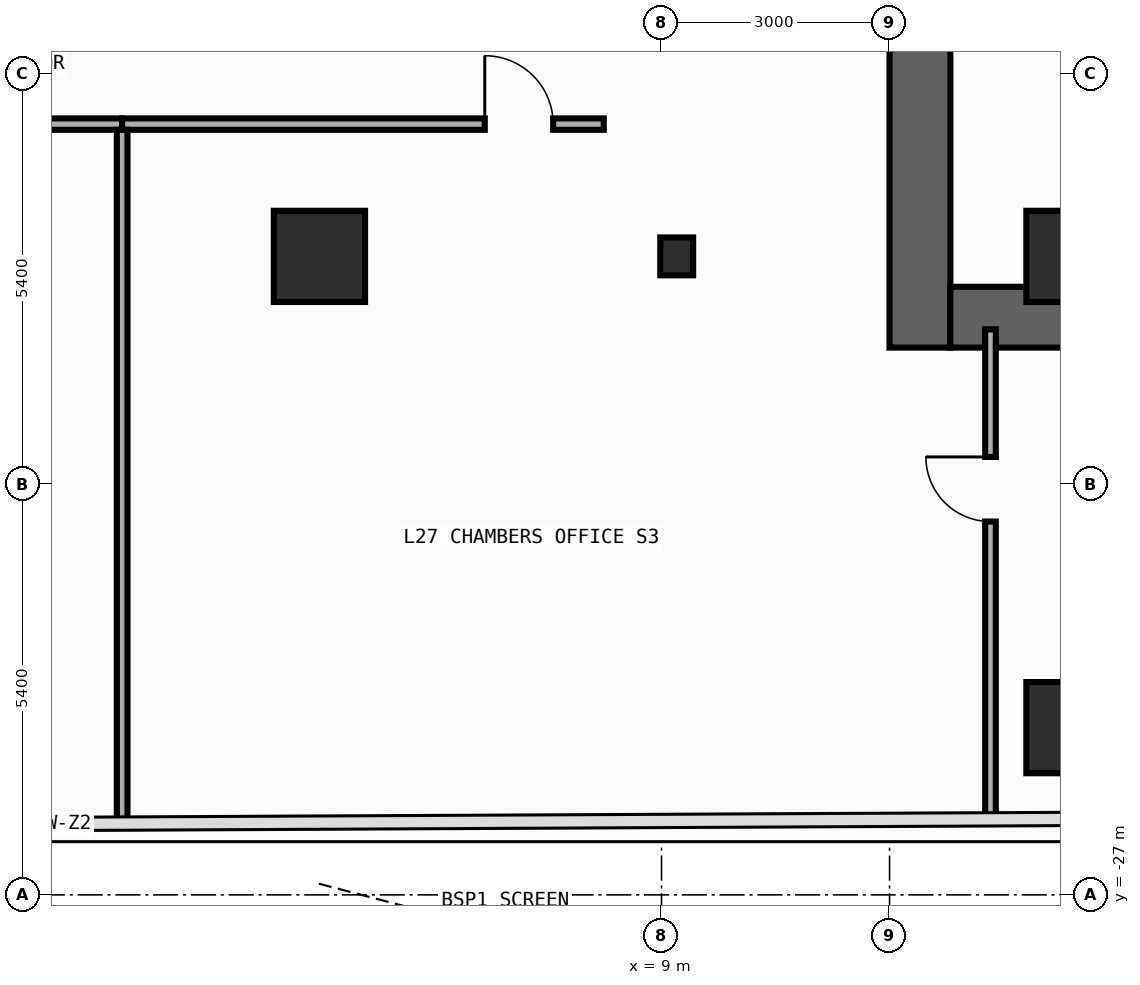
"""IFC4 building model, lengths in metres.
Left out: names, types, materials, properties, quantities, classifications, styles, units other than length and angle.
Written with IfcOpenShell. Run it as: python <this file> out.ifc"""

import sys

from ifc_helpers import new_model, si_unit, direction, frame, frame_2d, origin, origin_2d, place, context, subcontext, project, spatial, rectangle, i_section, extrude, element, fill, save


model = new_model("IFC4")
c1 = context("Model", 3, precision=1e-05, world=origin(), true_north=direction((0.0, 1.0)))
c2 = subcontext(c1, "Body", "Model", "MODEL_VIEW")
j1 = project(units=[si_unit("LENGTHUNIT", "METRE"), si_unit("PLANEANGLEUNIT", "RADIAN")], contexts=[c1])
p1 = place(None, origin())
s1 = spatial("IfcSite", under=j1, at=p1, CompositionType="ELEMENT")
p2 = place(p1, origin())
s2 = spatial("IfcBuilding", under=s1, at=p2, CompositionType="ELEMENT")
p3 = place(p2, frame((0.0, 0.0, 118.4)))
s3 = spatial("IfcBuildingStorey", under=s2, at=p3, CompositionType="ELEMENT", Elevation=118.4)
p4 = place(p3, frame((12.4, -19.8, 0.0), z_axis=(0.0, 0.0, 1.0), x_axis=(0.0, 1.0, 0.0)))
e1 = element("IfcWall", 1, at=p4, inside=s3, PredefinedType="SHEAR", context=c2, shape_type="SweptSolid", body=[
    extrude(rectangle(XDim=27.0, YDim=0.8, at=frame_2d((13.5, 0.0))), origin(), (0.0, 0.0, 1.0), 3.94),
])
p5 = place(p4, frame((23.05, 0.0, 0.0)))
e2 = element("IfcOpeningElement", 2, at=p5, cuts=e1, PredefinedType="OPENING", context=c2, shape_type="SweptSolid", body=[
    extrude(rectangle(XDim=1.1, YDim=2.2, at=frame_2d((0.55, 1.1))), frame((0.0, 0.41, 0.0), z_axis=(0.0, -1.0, 0.0), x_axis=(1.0, 0.0, 0.0)), (0.0, 0.0, 1.0), 0.82),
])
p6 = place(p4, frame((19.85, 0.0, 0.0)))
e3 = element("IfcOpeningElement", 3, at=p6, cuts=e1, PredefinedType="OPENING", context=c2, shape_type="SweptSolid", body=[
    extrude(rectangle(XDim=1.1, YDim=2.2, at=frame_2d((0.55, 1.1))), frame((0.0, 0.41, 0.0), z_axis=(0.0, -1.0, 0.0), x_axis=(1.0, 0.0, 0.0)), (0.0, 0.0, 1.0), 0.82),
])
p7 = place(p4, frame((16.65, 0.0, 0.0)))
e4 = element("IfcOpeningElement", 4, at=p7, cuts=e1, PredefinedType="OPENING", context=c2, shape_type="SweptSolid", body=[
    extrude(rectangle(XDim=1.1, YDim=2.2, at=frame_2d((0.55, 1.1))), frame((0.0, 0.41, 0.0), z_axis=(0.0, -1.0, 0.0), x_axis=(1.0, 0.0, 0.0)), (0.0, 0.0, 1.0), 0.82),
])
p8 = place(p4, frame((10.175, 0.0, 0.0)))
e5 = element("IfcOpeningElement", 5, at=p8, cuts=e1, PredefinedType="OPENING", context=c2, shape_type="SweptSolid", body=[
    extrude(rectangle(XDim=0.85, YDim=2.1, at=frame_2d((0.425, 1.05))), frame((0.0, 0.41, 0.0), z_axis=(0.0, -1.0, 0.0), x_axis=(1.0, 0.0, 0.0)), (0.0, 0.0, 1.0), 0.82),
])
p9 = place(p4, frame((12.725, 0.0, 0.0)))
e6 = element("IfcOpeningElement", 6, at=p9, cuts=e1, PredefinedType="OPENING", context=c2, shape_type="SweptSolid", body=[
    extrude(rectangle(XDim=1.15, YDim=2.2, at=frame_2d((0.575, 1.1))), frame((0.0, 0.41, 0.0), z_axis=(0.0, -1.0, 0.0), x_axis=(1.0, 0.0, 0.0)), (0.0, 0.0, 1.0), 0.82),
])
p10 = place(p4, frame((25.125, 0.0, 0.0)))
e7 = element("IfcOpeningElement", 7, at=p10, cuts=e1, PredefinedType="OPENING", context=c2, shape_type="SweptSolid", body=[
    extrude(rectangle(XDim=0.85, YDim=2.1, at=frame_2d((0.425, 1.05))), frame((0.0, 0.41, 0.0), z_axis=(0.0, -1.0, 0.0), x_axis=(1.0, 0.0, 0.0)), (0.0, 0.0, 1.0), 0.82),
])
p11 = place(p3, frame((12.8, -19.4, 0.0), z_axis=(0.0, 0.0, 1.0), x_axis=(1.0, 0.0, 0.0)))
e8 = element("IfcWall", 8, at=p11, inside=s3, PredefinedType="SHEAR", context=c2, shape_type="SweptSolid", body=[
    extrude(rectangle(XDim=6.8, YDim=0.8, at=frame_2d((3.4, 0.0))), origin(), (0.0, 0.0, 1.0), 3.94),
])
p12 = place(p3, frame((9.2, -18.6, 0.0), z_axis=(0.0, 0.0, 1.0), x_axis=(1.0, 0.0, 0.0)))
e9 = element("IfcColumn", 9, at=p12, inside=s3, PredefinedType="COLUMN", context=c2, shape_type="SweptSolid", body=[
    extrude(i_section(OverallWidth=0.432, OverallDepth=0.498, WebThickness=0.045, FlangeThickness=0.07, FilletRadius=0.022, at=origin_2d()), origin(), (0.0, 0.0, 1.0), 4.2),
])
for number, where, z_axis, x_axis in (
    (10, (14.4, -18.6, 0.0), (0.0, 0.0, 1.0), (1.0, 0.0, 0.0)),
    (11, (4.5, -18.6, 0.0), (0.0, 0.0, 1.0), (1.0, 0.0, 0.0)),
    (12, (14.4, -24.8, 0.0), (0.0, 0.0, 1.0), (1.0, 0.0, 0.0)),
):
    element("IfcColumn", number, at=place(p3, frame(where, z_axis=z_axis, x_axis=x_axis)), inside=s3, PredefinedType="COLUMN", context=c2, shape_type="SweptSolid", body=[
        extrude(rectangle(XDim=1.2, YDim=1.2, at=origin_2d()), origin(), (0.0, 0.0, 1.0), 4.2),
    ])
p13 = place(p3, frame((-8.24, -16.86, 0.0), z_axis=(0.0, 0.0, 1.0), x_axis=(1.0, 0.0, 0.0)))
e13 = element("IfcWall", 13, at=p13, inside=s3, PredefinedType="PARTITIONING", context=c2, shape_type="SweptSolid", body=[
    extrude(rectangle(XDim=10.144, YDim=0.15, at=frame_2d((5.072, 0.0))), origin(), (0.0, 0.0, 1.0), 3.94),
])
p14 = place(p13, frame((0.663, 0.0, 0.0)))
e14 = element("IfcOpeningElement", 14, at=p14, cuts=e13, PredefinedType="OPENING", context=c2, shape_type="SweptSolid", body=[
    extrude(rectangle(XDim=0.9, YDim=2.15, at=frame_2d((0.45, 1.075))), frame((0.0, 0.085, 0.0), z_axis=(0.0, -1.0, 0.0), x_axis=(1.0, 0.0, 0.0)), (0.0, 0.0, 1.0), 0.17),
])
p15 = place(p3, frame((1.904, -16.86, 0.0), z_axis=(0.0, 0.0, 1.0), x_axis=(1.0, 0.0, 0.0)))
e15 = element("IfcWall", 15, at=p15, inside=s3, PredefinedType="PARTITIONING", context=c2, shape_type="SweptSolid", body=[
    extrude(rectangle(XDim=6.336, YDim=0.15, at=frame_2d((3.168, 0.0))), origin(), (0.0, 0.0, 1.0), 3.94),
])
p16 = place(p15, frame((4.771, 0.0, 0.0)))
e16 = element("IfcOpeningElement", 16, at=p16, cuts=e15, PredefinedType="OPENING", context=c2, shape_type="SweptSolid", body=[
    extrude(rectangle(XDim=0.9, YDim=2.15, at=frame_2d((0.45, 1.075))), frame((0.0, 0.085, 0.0), z_axis=(0.0, -1.0, 0.0), x_axis=(1.0, 0.0, 0.0)), (0.0, 0.0, 1.0), 0.17),
])
p17 = place(p3, frame((1.904, -26.057, 0.0), z_axis=(0.0, 0.0, 1.0), x_axis=(0.0, 1.0, 0.0)))
e17 = element("IfcWall", 17, at=p17, inside=s3, PredefinedType="PARTITIONING", context=c2, shape_type="SweptSolid", body=[
    extrude(rectangle(XDim=9.122, YDim=0.14, at=frame_2d((4.561, 0.0))), origin(), (0.0, 0.0, 1.0), 3.94),
])
p18 = place(p3, frame((13.328, -26.001, 0.0), z_axis=(0.0, 0.0, 1.0), x_axis=(0.0, 1.0, 0.0)))
e18 = element("IfcWall", 18, at=p18, inside=s3, PredefinedType="PARTITIONING", context=c2, shape_type="SweptSolid", body=[
    extrude(rectangle(XDim=6.441, YDim=0.14, at=frame_2d((3.221, 0.0))), origin(), (0.0, 0.0, 1.0), 3.94),
])
p19 = place(p18, frame((3.913, 0.0, 0.0)))
e19 = element("IfcOpeningElement", 19, at=p19, cuts=e18, PredefinedType="OPENING", context=c2, shape_type="SweptSolid", body=[
    extrude(rectangle(XDim=0.85, YDim=2.1, at=frame_2d((0.425, 1.05))), frame((0.0, 0.08, 0.0), z_axis=(0.0, -1.0, 0.0), x_axis=(1.0, 0.0, 0.0)), (0.0, 0.0, 1.0), 0.16),
])
p20 = place(p16, origin())
e20 = element("IfcDoor", 20, at=p20, inside=s3, OperationType="SINGLE_SWING_LEFT", PredefinedType="DOOR", context=c2, shape_type="SweptSolid", body=[
    extrude(rectangle(XDim=0.9, YDim=2.15, at=frame_2d((0.45, 1.075))), frame((0.0, 0.025, 0.0), z_axis=(0.0, -1.0, 0.0), x_axis=(1.0, 0.0, 0.0)), (0.0, 0.0, 1.0), 0.05),
])
fill(e16, e20)
p21 = place(p19, origin())
e21 = element("IfcDoor", 21, at=p21, inside=s3, OperationType="SINGLE_SWING_RIGHT", PredefinedType="DOOR", context=c2, shape_type="SweptSolid", body=[
    extrude(rectangle(XDim=0.85, YDim=2.1, at=frame_2d((0.425, 1.05))), frame((0.0, 0.025, 0.0), z_axis=(0.0, -1.0, 0.0), x_axis=(1.0, 0.0, 0.0)), (0.0, 0.0, 1.0), 0.05),
])
fill(e19, e21)
save(model, sys.argv[1])
